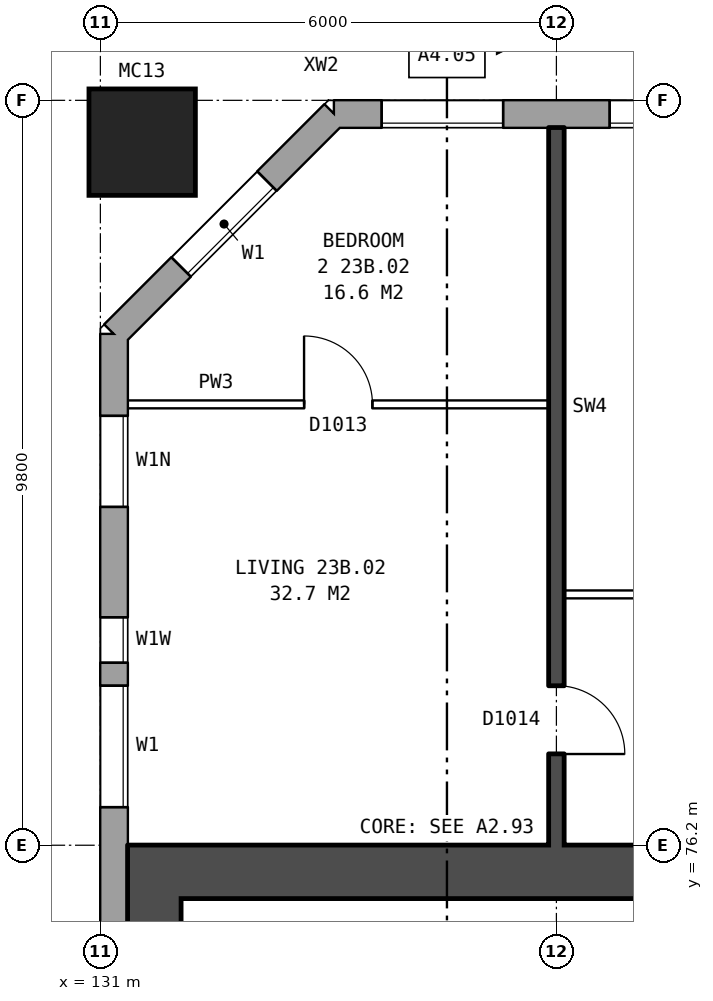
"""IFC4 building model, lengths in metres.
Left out: names, types, materials, properties, quantities, classifications, styles, units other than length and angle.
Written with IfcOpenShell. Run it as: python <this file> out.ifc"""

import sys

from ifc_helpers import new_model, si_unit, direction, frame, frame_2d, origin, origin_2d, place, context, subcontext, project, spatial, rectangle, hollow_rectangle, extrude, element, fill, save


model = new_model("IFC4")
c1 = context("Model", 3, precision=1e-05, world=origin(), true_north=direction((0.0, 1.0)))
c2 = subcontext(c1, "Body", "Model", "MODEL_VIEW")
j1 = project(units=[si_unit("LENGTHUNIT", "METRE"), si_unit("PLANEANGLEUNIT", "RADIAN")], contexts=[c1])
p1 = place(None, origin())
s1 = spatial("IfcSite", under=j1, at=p1, CompositionType="ELEMENT")
p2 = place(p1, origin())
s2 = spatial("IfcBuilding", under=s1, at=p2, CompositionType="ELEMENT")
p3 = place(p2, frame((0.0, 0.0, 84.0)))
s3 = spatial("IfcBuildingStorey", under=s2, at=p3, CompositionType="ELEMENT", Elevation=84.0)
p4 = place(p3, frame((131.55, 85.45, 0.0), z_axis=(0.0, 0.0, 1.0), x_axis=(1.0, 0.0, 0.0)))
e1 = element("IfcColumn", 1, at=p4, inside=s3, PredefinedType="COLUMN", context=c2, shape_type="SweptSolid", body=[
    extrude(hollow_rectangle(XDim=1.4, YDim=1.4, WallThickness=0.075, at=origin_2d()), origin(), (0.0, 0.0, 1.0), 3.1),
])
p5 = place(p3, frame((172.175, 85.82, 0.0), z_axis=(0.0, 0.0, 1.0), x_axis=(-1.0, 0.0, 0.0)))
e2 = element("IfcWall", 2, at=p5, inside=s3, PredefinedType="STANDARD", context=c2, shape_type="SweptSolid", body=[
    extrude(rectangle(XDim=38.101, YDim=0.36, at=frame_2d((19.05, 0.0))), origin(), (0.0, 0.0, 1.0), 2.85),
])
p6 = place(p5, frame((2.875, 0.0, 0.8)))
e3 = element("IfcOpeningElement", 3, at=p6, cuts=e2, PredefinedType="OPENING", context=c2, shape_type="SweptSolid", body=[
    extrude(rectangle(XDim=1.6, YDim=1.8, at=frame_2d((0.8, 0.9))), frame((0.0, 0.19, 0.0), z_axis=(0.0, -1.0, 0.0), x_axis=(1.0, 0.0, 0.0)), (0.0, 0.0, 1.0), 0.38),
])
p7 = place(p5, frame((5.875, 0.0, 0.8)))
e4 = element("IfcOpeningElement", 4, at=p7, cuts=e2, PredefinedType="OPENING", context=c2, shape_type="SweptSolid", body=[
    extrude(rectangle(XDim=1.6, YDim=1.8, at=frame_2d((0.8, 0.9))), frame((0.0, 0.19, 0.0), z_axis=(0.0, -1.0, 0.0), x_axis=(1.0, 0.0, 0.0)), (0.0, 0.0, 1.0), 0.38),
])
p8 = place(p5, frame((8.875, 0.0, 0.8)))
e5 = element("IfcOpeningElement", 5, at=p8, cuts=e2, PredefinedType="OPENING", context=c2, shape_type="SweptSolid", body=[
    extrude(rectangle(XDim=1.6, YDim=1.8, at=frame_2d((0.8, 0.9))), frame((0.0, 0.19, 0.0), z_axis=(0.0, -1.0, 0.0), x_axis=(1.0, 0.0, 0.0)), (0.0, 0.0, 1.0), 0.38),
])
p9 = place(p5, frame((11.875, 0.0, 0.8)))
e6 = element("IfcOpeningElement", 6, at=p9, cuts=e2, PredefinedType="OPENING", context=c2, shape_type="SweptSolid", body=[
    extrude(rectangle(XDim=1.6, YDim=1.8, at=frame_2d((0.8, 0.9))), frame((0.0, 0.19, 0.0), z_axis=(0.0, -1.0, 0.0), x_axis=(1.0, 0.0, 0.0)), (0.0, 0.0, 1.0), 0.38),
])
p10 = place(p5, frame((13.775, 0.0, 1.6)))
e7 = element("IfcOpeningElement", 7, at=p10, cuts=e2, PredefinedType="OPENING", context=c2, shape_type="SweptSolid", body=[
    extrude(rectangle(XDim=0.6, YDim=0.9, at=frame_2d((0.3, 0.45))), frame((0.0, 0.19, 0.0), z_axis=(0.0, -1.0, 0.0), x_axis=(1.0, 0.0, 0.0)), (0.0, 0.0, 1.0), 0.38),
])
p11 = place(p5, frame((17.875, 0.0, 0.8)))
e8 = element("IfcOpeningElement", 8, at=p11, cuts=e2, PredefinedType="OPENING", context=c2, shape_type="SweptSolid", body=[
    extrude(rectangle(XDim=1.6, YDim=1.8, at=frame_2d((0.8, 0.9))), frame((0.0, 0.19, 0.0), z_axis=(0.0, -1.0, 0.0), x_axis=(1.0, 0.0, 0.0)), (0.0, 0.0, 1.0), 0.38),
])
p12 = place(p5, frame((20.325, 0.0, 0.65)))
e9 = element("IfcOpeningElement", 9, at=p12, cuts=e2, PredefinedType="OPENING", context=c2, shape_type="SweptSolid", body=[
    extrude(rectangle(XDim=1.4, YDim=1.8, at=frame_2d((0.7, 0.9))), frame((0.0, 0.19, 0.0), z_axis=(0.0, -1.0, 0.0), x_axis=(1.0, 0.0, 0.0)), (0.0, 0.0, 1.0), 0.38),
])
p13 = place(p5, frame((23.625, 0.0, 1.7)))
e10 = element("IfcOpeningElement", 10, at=p13, cuts=e2, PredefinedType="OPENING", context=c2, shape_type="SweptSolid", body=[
    extrude(rectangle(XDim=0.6, YDim=0.9, at=frame_2d((0.3, 0.45))), frame((0.0, 0.19, 0.0), z_axis=(0.0, -1.0, 0.0), x_axis=(1.0, 0.0, 0.0)), (0.0, 0.0, 1.0), 0.38),
])
p14 = place(p5, frame((26.875, 0.0, 0.8)))
e11 = element("IfcOpeningElement", 11, at=p14, cuts=e2, PredefinedType="OPENING", context=c2, shape_type="SweptSolid", body=[
    extrude(rectangle(XDim=1.6, YDim=1.8, at=frame_2d((0.8, 0.9))), frame((0.0, 0.19, 0.0), z_axis=(0.0, -1.0, 0.0), x_axis=(1.0, 0.0, 0.0)), (0.0, 0.0, 1.0), 0.38),
])
p15 = place(p5, frame((29.875, 0.0, 0.8)))
e12 = element("IfcOpeningElement", 12, at=p15, cuts=e2, PredefinedType="OPENING", context=c2, shape_type="SweptSolid", body=[
    extrude(rectangle(XDim=1.6, YDim=1.8, at=frame_2d((0.8, 0.9))), frame((0.0, 0.19, 0.0), z_axis=(0.0, -1.0, 0.0), x_axis=(1.0, 0.0, 0.0)), (0.0, 0.0, 1.0), 0.38),
])
p16 = place(p5, frame((32.875, 0.0, 0.8)))
e13 = element("IfcOpeningElement", 13, at=p16, cuts=e2, PredefinedType="OPENING", context=c2, shape_type="SweptSolid", body=[
    extrude(rectangle(XDim=1.6, YDim=1.8, at=frame_2d((0.8, 0.9))), frame((0.0, 0.19, 0.0), z_axis=(0.0, -1.0, 0.0), x_axis=(1.0, 0.0, 0.0)), (0.0, 0.0, 1.0), 0.38),
])
p17 = place(p5, frame((35.875, 0.0, 0.8)))
e14 = element("IfcOpeningElement", 14, at=p17, cuts=e2, PredefinedType="OPENING", context=c2, shape_type="SweptSolid", body=[
    extrude(rectangle(XDim=1.6, YDim=1.8, at=frame_2d((0.8, 0.9))), frame((0.0, 0.19, 0.0), z_axis=(0.0, -1.0, 0.0), x_axis=(1.0, 0.0, 0.0)), (0.0, 0.0, 1.0), 0.38),
])
p18 = place(p5, frame((15.925, 0.0, 0.8)))
e15 = element("IfcOpeningElement", 15, at=p18, cuts=e2, PredefinedType="OPENING", context=c2, shape_type="SweptSolid", body=[
    extrude(rectangle(XDim=1.0, YDim=1.2, at=frame_2d((0.5, 0.6))), frame((0.0, 0.19, 0.0), z_axis=(0.0, -1.0, 0.0), x_axis=(1.0, 0.0, 0.0)), (0.0, 0.0, 1.0), 0.38),
])
p19 = place(p5, frame((22.025, 0.0, 0.65)))
e16 = element("IfcOpeningElement", 16, at=p19, cuts=e2, PredefinedType="OPENING", context=c2, shape_type="SweptSolid", body=[
    extrude(rectangle(XDim=0.6, YDim=0.9, at=frame_2d((0.3, 0.45))), frame((0.0, 0.19, 0.0), z_axis=(0.0, -1.0, 0.0), x_axis=(1.0, 0.0, 0.0)), (0.0, 0.0, 1.0), 0.38),
])
p20 = place(p5, frame((24.525, 0.0, 0.8)))
e17 = element("IfcOpeningElement", 17, at=p20, cuts=e2, PredefinedType="OPENING", context=c2, shape_type="SweptSolid", body=[
    extrude(rectangle(XDim=1.4, YDim=1.8, at=frame_2d((0.7, 0.9))), frame((0.0, 0.19, 0.0), z_axis=(0.0, -1.0, 0.0), x_axis=(1.0, 0.0, 0.0)), (0.0, 0.0, 1.0), 0.38),
])
p21 = place(p3, frame((134.075, 85.82, 0.0), z_axis=(0.0, 0.0, 1.0), x_axis=(-0.707106781187, -0.707106781187, 0.0)))
e18 = element("IfcWall", 18, at=p21, inside=s3, PredefinedType="STANDARD", context=c2, shape_type="SweptSolid", body=[
    extrude(rectangle(XDim=4.094, YDim=0.36, at=frame_2d((2.047, 0.0))), origin(), (0.0, 0.0, 1.0), 2.85),
])
p22 = place(p21, frame((1.247, 0.0, 0.8)))
e19 = element("IfcOpeningElement", 19, at=p22, cuts=e18, PredefinedType="OPENING", context=c2, shape_type="SweptSolid", body=[
    extrude(rectangle(XDim=1.6, YDim=1.8, at=frame_2d((0.8, 0.9))), frame((0.0, 0.19, 0.0), z_axis=(0.0, -1.0, 0.0), x_axis=(1.0, 0.0, 0.0)), (0.0, 0.0, 1.0), 0.38),
])
p23 = place(p3, frame((131.18, 82.925, 0.0), z_axis=(0.0, 0.0, 1.0), x_axis=(0.0, -1.0, 0.0)))
e20 = element("IfcWall", 20, at=p23, inside=s3, PredefinedType="STANDARD", context=c2, shape_type="SweptSolid", body=[
    extrude(rectangle(XDim=25.851, YDim=0.36, at=frame_2d((12.925, 0.0))), origin(), (0.0, 0.0, 1.0), 2.85),
])
p24 = place(p23, frame((1.075, 0.0, 0.8)))
e21 = element("IfcOpeningElement", 21, at=p24, cuts=e20, PredefinedType="OPENING", context=c2, shape_type="SweptSolid", body=[
    extrude(rectangle(XDim=1.2, YDim=1.2, at=frame_2d((0.6, 0.6))), frame((0.0, 0.19, 0.0), z_axis=(0.0, -1.0, 0.0), x_axis=(1.0, 0.0, 0.0)), (0.0, 0.0, 1.0), 0.38),
])
p25 = place(p23, frame((4.625, 0.0, 0.8)))
e22 = element("IfcOpeningElement", 22, at=p25, cuts=e20, PredefinedType="OPENING", context=c2, shape_type="SweptSolid", body=[
    extrude(rectangle(XDim=1.6, YDim=1.8, at=frame_2d((0.8, 0.9))), frame((0.0, 0.19, 0.0), z_axis=(0.0, -1.0, 0.0), x_axis=(1.0, 0.0, 0.0)), (0.0, 0.0, 1.0), 0.38),
])
p26 = place(p23, frame((19.625, 0.0, 0.8)))
e23 = element("IfcOpeningElement", 23, at=p26, cuts=e20, PredefinedType="OPENING", context=c2, shape_type="SweptSolid", body=[
    extrude(rectangle(XDim=1.6, YDim=1.8, at=frame_2d((0.8, 0.9))), frame((0.0, 0.19, 0.0), z_axis=(0.0, -1.0, 0.0), x_axis=(1.0, 0.0, 0.0)), (0.0, 0.0, 1.0), 0.38),
])
p27 = place(p23, frame((21.525, 0.0, 1.7)))
e24 = element("IfcOpeningElement", 24, at=p27, cuts=e20, PredefinedType="OPENING", context=c2, shape_type="SweptSolid", body=[
    extrude(rectangle(XDim=0.6, YDim=0.9, at=frame_2d((0.3, 0.45))), frame((0.0, 0.19, 0.0), z_axis=(0.0, -1.0, 0.0), x_axis=(1.0, 0.0, 0.0)), (0.0, 0.0, 1.0), 0.38),
])
p28 = place(p23, frame((3.725, 0.0, 1.7)))
e25 = element("IfcOpeningElement", 25, at=p28, cuts=e20, PredefinedType="OPENING", context=c2, shape_type="SweptSolid", body=[
    extrude(rectangle(XDim=0.6, YDim=0.9, at=frame_2d((0.3, 0.45))), frame((0.0, 0.19, 0.0), z_axis=(0.0, -1.0, 0.0), x_axis=(1.0, 0.0, 0.0)), (0.0, 0.0, 1.0), 0.38),
])
p29 = place(p23, frame((23.125, 0.0, 0.8)))
e26 = element("IfcOpeningElement", 26, at=p29, cuts=e20, PredefinedType="OPENING", context=c2, shape_type="SweptSolid", body=[
    extrude(rectangle(XDim=1.6, YDim=0.9, at=frame_2d((0.8, 0.45))), frame((0.0, 0.19, 0.0), z_axis=(0.0, -1.0, 0.0), x_axis=(1.0, 0.0, 0.0)), (0.0, 0.0, 1.0), 0.38),
])
p30 = place(p3, frame((131.71, 64.5, 0.0), z_axis=(0.0, 0.0, 1.0), x_axis=(0.0, 1.0, 0.0)))
e27 = element("IfcWall", 27, at=p30, inside=s3, PredefinedType="SHEAR", context=c2, shape_type="SweptSolid", body=[
    extrude(rectangle(XDim=11.0, YDim=0.7, at=frame_2d((5.5, 0.0))), origin(), (0.0, 0.0, 1.0), 2.85),
])
p31 = place(p3, frame((139.76, 75.85, 0.0), z_axis=(0.0, 0.0, 1.0), x_axis=(-1.0, 0.0, 0.0)))
e28 = element("IfcWall", 28, at=p31, inside=s3, PredefinedType="SHEAR", context=c2, shape_type="SweptSolid", body=[
    extrude(rectangle(XDim=8.4, YDim=0.7, at=frame_2d((4.2, 0.0))), origin(), (0.0, 0.0, 1.0), 2.85),
])
p32 = place(p3, frame((137.1, 79.5, 0.0), z_axis=(0.0, 0.0, 1.0), x_axis=(1.0, 0.0, 0.0)))
e29 = element("IfcWall", 29, at=p32, inside=s3, PredefinedType="PARTITIONING", context=c2, shape_type="SweptSolid", body=[
    extrude(rectangle(XDim=5.8, YDim=0.1, at=frame_2d((2.9, 0.0))), origin(), (0.0, 0.0, 1.0), 2.85),
])
p33 = place(p32, frame((1.3, 0.0, 0.0)))
e30 = element("IfcOpeningElement", 30, at=p33, cuts=e29, PredefinedType="OPENING", context=c2, shape_type="SweptSolid", body=[
    extrude(rectangle(XDim=0.9, YDim=2.1, at=frame_2d((0.45, 1.05))), frame((0.0, 0.06, 0.0), z_axis=(0.0, -1.0, 0.0), x_axis=(1.0, 0.0, 0.0)), (0.0, 0.0, 1.0), 0.12),
])
p34 = place(p32, frame((4.2, 0.0, 0.0)))
e31 = element("IfcOpeningElement", 31, at=p34, cuts=e29, PredefinedType="OPENING", context=c2, shape_type="SweptSolid", body=[
    extrude(rectangle(XDim=0.9, YDim=2.1, at=frame_2d((0.45, 1.05))), frame((0.0, 0.06, 0.0), z_axis=(0.0, -1.0, 0.0), x_axis=(1.0, 0.0, 0.0)), (0.0, 0.0, 1.0), 0.12),
])
p35 = place(p3, frame((131.36, 82.0, 0.0), z_axis=(0.0, 0.0, 1.0), x_axis=(1.0, 0.0, 0.0)))
e32 = element("IfcWall", 32, at=p35, inside=s3, PredefinedType="PARTITIONING", context=c2, shape_type="SweptSolid", body=[
    extrude(rectangle(XDim=5.54, YDim=0.1, at=frame_2d((2.77, 0.0))), origin(), (0.0, 0.0, 1.0), 2.85),
])
p36 = place(p35, frame((2.32, 0.0, 0.0)))
e33 = element("IfcOpeningElement", 33, at=p36, cuts=e32, PredefinedType="OPENING", context=c2, shape_type="SweptSolid", body=[
    extrude(rectangle(XDim=0.9, YDim=2.1, at=frame_2d((0.45, 1.05))), frame((0.0, 0.06, 0.0), z_axis=(0.0, -1.0, 0.0), x_axis=(1.0, 0.0, 0.0)), (0.0, 0.0, 1.0), 0.12),
])
p37 = place(p3, frame((137.0, 76.2, 0.0), z_axis=(0.0, 0.0, 1.0), x_axis=(0.0, 1.0, 0.0)))
e34 = element("IfcWall", 34, at=p37, inside=s3, PredefinedType="SOLIDWALL", context=c2, shape_type="SweptSolid", body=[
    extrude(rectangle(XDim=9.44, YDim=0.2, at=frame_2d((4.72, 0.0))), origin(), (0.0, 0.0, 1.0), 2.85),
])
p38 = place(p37, frame((1.2, 0.0, 0.0)))
e35 = element("IfcOpeningElement", 35, at=p38, cuts=e34, PredefinedType="OPENING", context=c2, shape_type="SweptSolid", body=[
    extrude(rectangle(XDim=0.9, YDim=2.1, at=frame_2d((0.45, 1.05))), frame((0.0, 0.11, 0.0), z_axis=(0.0, -1.0, 0.0), x_axis=(1.0, 0.0, 0.0)), (0.0, 0.0, 1.0), 0.22),
])
p39 = place(p16, origin())
e36 = element("IfcWindow", 36, at=p39, inside=s3, PartitioningType="SINGLE_PANEL", PredefinedType="WINDOW", context=c2, shape_type="SweptSolid", body=[
    extrude(rectangle(XDim=1.6, YDim=1.8, at=frame_2d((0.8, 0.9))), frame((0.0, 0.15, 0.0), z_axis=(0.0, -1.0, 0.0), x_axis=(1.0, 0.0, 0.0)), (0.0, 0.0, 1.0), 0.06),
])
fill(e13, e36)
p40 = place(p17, origin())
e37 = element("IfcWindow", 37, at=p40, inside=s3, PartitioningType="SINGLE_PANEL", PredefinedType="WINDOW", context=c2, shape_type="SweptSolid", body=[
    extrude(rectangle(XDim=1.6, YDim=1.8, at=frame_2d((0.8, 0.9))), frame((0.0, 0.15, 0.0), z_axis=(0.0, -1.0, 0.0), x_axis=(1.0, 0.0, 0.0)), (0.0, 0.0, 1.0), 0.06),
])
fill(e14, e37)
p41 = place(p22, origin())
e38 = element("IfcWindow", 38, at=p41, inside=s3, PartitioningType="SINGLE_PANEL", PredefinedType="WINDOW", context=c2, shape_type="SweptSolid", body=[
    extrude(rectangle(XDim=1.6, YDim=1.8, at=frame_2d((0.8, 0.9))), frame((0.0, 0.15, 0.0), z_axis=(0.0, -1.0, 0.0), x_axis=(1.0, 0.0, 0.0)), (0.0, 0.0, 1.0), 0.06),
])
fill(e19, e38)
p42 = place(p24, origin())
e39 = element("IfcWindow", 39, at=p42, inside=s3, PartitioningType="SINGLE_PANEL", PredefinedType="WINDOW", context=c2, shape_type="SweptSolid", body=[
    extrude(rectangle(XDim=1.2, YDim=1.2, at=frame_2d((0.6, 0.6))), frame((0.0, 0.15, 0.0), z_axis=(0.0, -1.0, 0.0), x_axis=(1.0, 0.0, 0.0)), (0.0, 0.0, 1.0), 0.06),
])
fill(e21, e39)
p43 = place(p25, origin())
e40 = element("IfcWindow", 40, at=p43, inside=s3, PartitioningType="SINGLE_PANEL", PredefinedType="WINDOW", context=c2, shape_type="SweptSolid", body=[
    extrude(rectangle(XDim=1.6, YDim=1.8, at=frame_2d((0.8, 0.9))), frame((0.0, 0.15, 0.0), z_axis=(0.0, -1.0, 0.0), x_axis=(1.0, 0.0, 0.0)), (0.0, 0.0, 1.0), 0.06),
])
fill(e22, e40)
p44 = place(p36, origin())
e41 = element("IfcDoor", 41, at=p44, inside=s3, OperationType="SINGLE_SWING_LEFT", PredefinedType="DOOR", context=c2, shape_type="SweptSolid", body=[
    extrude(rectangle(XDim=0.9, YDim=2.1, at=frame_2d((0.45, 1.05))), frame((0.0, 0.025, 0.0), z_axis=(0.0, -1.0, 0.0), x_axis=(1.0, 0.0, 0.0)), (0.0, 0.0, 1.0), 0.05),
])
fill(e33, e41)
p45 = place(p38, frame((0.9, 0.0, 0.0), z_axis=(0.0, 0.0, 1.0), x_axis=(-1.0, 0.0, 0.0)))
e42 = element("IfcDoor", 42, at=p45, inside=s3, OperationType="SINGLE_SWING_RIGHT", PredefinedType="DOOR", context=c2, shape_type="SweptSolid", body=[
    extrude(rectangle(XDim=0.9, YDim=2.1, at=frame_2d((0.45, 1.05))), frame((0.0, 0.025, 0.0), z_axis=(0.0, -1.0, 0.0), x_axis=(1.0, 0.0, 0.0)), (0.0, 0.0, 1.0), 0.05),
])
fill(e35, e42)
p46 = place(p28, origin())
e43 = element("IfcWindow", 43, at=p46, inside=s3, PartitioningType="SINGLE_PANEL", PredefinedType="WINDOW", context=c2, shape_type="SweptSolid", body=[
    extrude(rectangle(XDim=0.6, YDim=0.9, at=frame_2d((0.3, 0.45))), frame((0.0, 0.15, 0.0), z_axis=(0.0, -1.0, 0.0), x_axis=(1.0, 0.0, 0.0)), (0.0, 0.0, 1.0), 0.06),
])
fill(e25, e43)
save(model, sys.argv[1])
